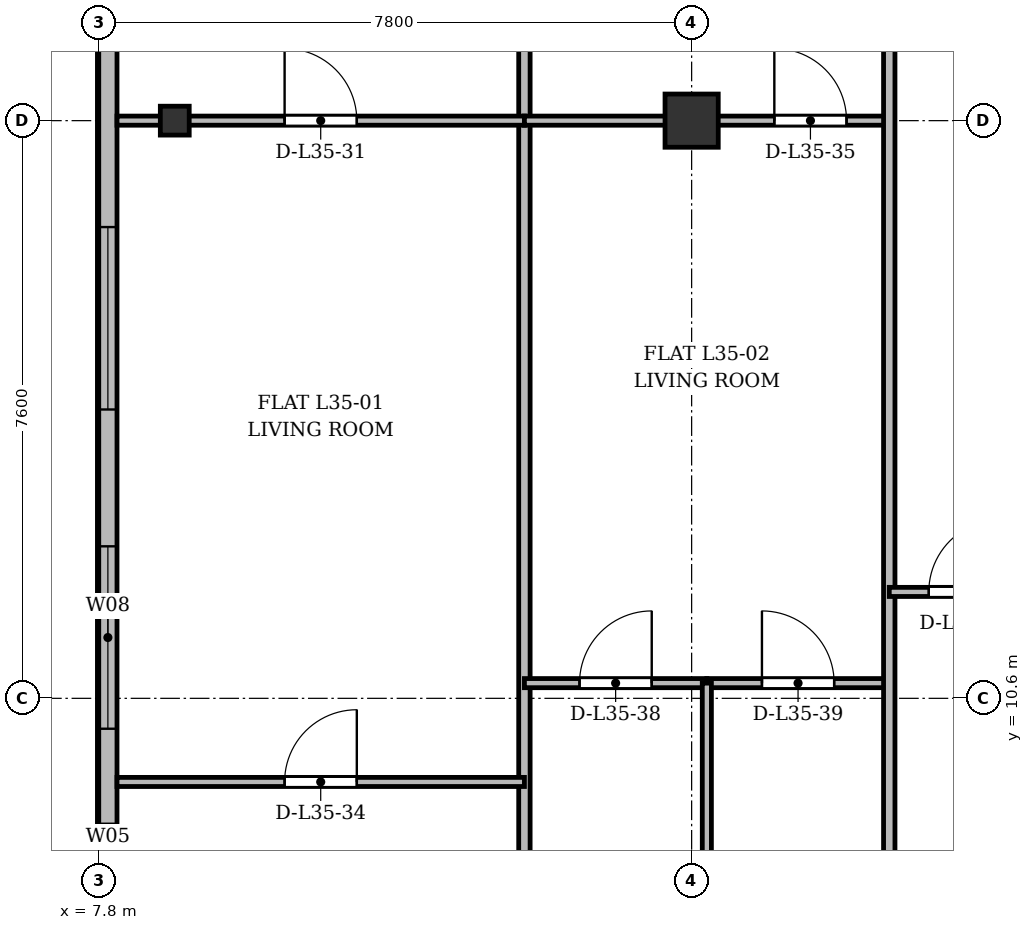
"""IFC4 building model, lengths in metres.
Left out: names, types, materials, properties, quantities, classifications, styles, units other than length and angle.
Written with IfcOpenShell. Run it as: python <this file> out.ifc"""

import sys

from ifc_helpers import new_model, si_unit, direction, frame, frame_2d, origin, origin_2d, place, context, subcontext, project, spatial, rectangle, i_section, extrude, source, transform, mapped, element, fill, save


model = new_model("IFC4")
c1 = context("Model", 3, precision=1e-05, world=origin(), true_north=direction((0.0, 1.0)))
c2 = subcontext(c1, "Body", "Model", "MODEL_VIEW")
j1 = project(units=[si_unit("LENGTHUNIT", "METRE"), si_unit("PLANEANGLEUNIT", "RADIAN")], contexts=[c1])
p1 = place(None, origin())
s1 = spatial("IfcSite", under=j1, at=p1, CompositionType="ELEMENT")
p2 = place(p1, origin())
s2 = spatial("IfcBuilding", under=s1, at=p2, CompositionType="ELEMENT")
p3 = place(p2, frame((0.0, 0.0, 135.7)))
s3 = spatial("IfcBuildingStorey", under=s2, at=p3, CompositionType="ELEMENT", Elevation=135.7)
m1 = source(origin(), c2, "Body", "SweptSolid", [
    extrude(i_section(OverallWidth=0.38, OverallDepth=0.38, WebThickness=0.02, FlangeThickness=0.03, at=origin_2d()), origin(), (0.0, 0.0, 1.0), 3.6),
])
p4 = place(p3, frame((8.8, 18.2, 0.0), z_axis=(0.0, 0.0, 1.0), x_axis=(1.0, 0.0, 0.0)))
e1 = element("IfcColumn", 1, at=p4, inside=s3, PredefinedType="COLUMN", context=c2, shape_type="MappedRepresentation", body=[
    mapped(m1, transform((0.0, 0.0, 0.0), x_axis=(1.0, 0.0, 0.0), y_axis=(0.0, 1.0, 0.0), z_axis=(0.0, 0.0, 1.0), scale=1.0)),
])
m2 = source(origin(), c2, "Body", "SweptSolid", [
    extrude(rectangle(XDim=0.7, YDim=0.7, at=origin_2d()), origin(), (0.0, 0.0, 1.0), 3.6),
])
p5 = place(p3, frame((15.6, 18.2, 0.0), z_axis=(0.0, 0.0, 1.0), x_axis=(1.0, 0.0, 0.0)))
e2 = element("IfcColumn", 2, at=p5, inside=s3, PredefinedType="COLUMN", context=c2, shape_type="MappedRepresentation", body=[
    mapped(m2, transform((0.0, 0.0, 0.0), x_axis=(1.0, 0.0, 0.0), y_axis=(0.0, 1.0, 0.0), z_axis=(0.0, 0.0, 1.0), scale=1.0)),
])
p6 = place(p3, frame((7.92, 6.3, 0.0), z_axis=(0.0, 0.0, 1.0), x_axis=(0.0, 1.0, 0.0)))
e3 = element("IfcWall", 3, at=p6, inside=s3, PredefinedType="SOLIDWALL", context=c2, shape_type="SweptSolid", body=[
    extrude(rectangle(XDim=39.2, YDim=0.24, at=frame_2d((19.6, 0.0))), origin(), (0.0, 0.0, 1.0), 3.35),
])
p7 = place(p6, frame((1.45, 0.0, 0.92)))
e4 = element("IfcOpeningElement", 4, at=p7, cuts=e3, PredefinedType="OPENING", context=c2, shape_type="SweptSolid", body=[
    extrude(rectangle(XDim=1.2, YDim=1.65, at=frame_2d((0.6, 0.825))), frame((0.0, 0.13, 0.0), z_axis=(0.0, -1.0, 0.0), x_axis=(1.0, 0.0, 0.0)), (0.0, 0.0, 1.0), 0.26),
])
p8 = place(p6, frame((3.9, 0.0, 0.92)))
e5 = element("IfcOpeningElement", 5, at=p8, cuts=e3, PredefinedType="OPENING", context=c2, shape_type="SweptSolid", body=[
    extrude(rectangle(XDim=2.4, YDim=2.1, at=frame_2d((1.2, 1.05))), frame((0.0, 0.13, 0.0), z_axis=(0.0, -1.0, 0.0), x_axis=(1.0, 0.0, 0.0)), (0.0, 0.0, 1.0), 0.26),
])
p9 = place(p6, frame((8.1, 0.0, 0.92)))
e6 = element("IfcOpeningElement", 6, at=p9, cuts=e3, PredefinedType="OPENING", context=c2, shape_type="SweptSolid", body=[
    extrude(rectangle(XDim=2.4, YDim=2.1, at=frame_2d((1.2, 1.05))), frame((0.0, 0.13, 0.0), z_axis=(0.0, -1.0, 0.0), x_axis=(1.0, 0.0, 0.0)), (0.0, 0.0, 1.0), 0.26),
])
p10 = place(p6, frame((15.3, 0.0, 0.92)))
e7 = element("IfcOpeningElement", 7, at=p10, cuts=e3, PredefinedType="OPENING", context=c2, shape_type="SweptSolid", body=[
    extrude(rectangle(XDim=2.4, YDim=2.1, at=frame_2d((1.2, 1.05))), frame((0.0, 0.13, 0.0), z_axis=(0.0, -1.0, 0.0), x_axis=(1.0, 0.0, 0.0)), (0.0, 0.0, 1.0), 0.26),
])
p11 = place(p6, frame((33.5, 0.0, 0.92)))
e8 = element("IfcOpeningElement", 8, at=p11, cuts=e3, PredefinedType="OPENING", context=c2, shape_type="SweptSolid", body=[
    extrude(rectangle(XDim=1.2, YDim=1.65, at=frame_2d((0.6, 0.825))), frame((0.0, 0.13, 0.0), z_axis=(0.0, -1.0, 0.0), x_axis=(1.0, 0.0, 0.0)), (0.0, 0.0, 1.0), 0.26),
])
p12 = place(p6, frame((36.85, 0.0, 0.92)))
e9 = element("IfcOpeningElement", 9, at=p12, cuts=e3, PredefinedType="OPENING", context=c2, shape_type="SweptSolid", body=[
    extrude(rectangle(XDim=1.2, YDim=1.65, at=frame_2d((0.6, 0.825))), frame((0.0, 0.13, 0.0), z_axis=(0.0, -1.0, 0.0), x_axis=(1.0, 0.0, 0.0)), (0.0, 0.0, 1.0), 0.26),
])
p13 = place(p3, frame((13.4, 3.525, 0.0), z_axis=(0.0, 0.0, 1.0), x_axis=(0.0, 1.0, 0.0)))
e10 = element("IfcWall", 10, at=p13, inside=s3, PredefinedType="PARTITIONING", context=c2, shape_type="SweptSolid", body=[
    extrude(rectangle(XDim=27.275, YDim=0.15, at=frame_2d((13.638, 0.0))), origin(), (0.0, 0.0, 1.0), 2.75),
])
p14 = place(p3, frame((8.04, 18.2, 0.0), z_axis=(0.0, 0.0, 1.0), x_axis=(1.0, 0.0, 0.0)))
e11 = element("IfcWall", 11, at=p14, inside=s3, PredefinedType="PARTITIONING", context=c2, shape_type="SweptSolid", body=[
    extrude(rectangle(XDim=5.36, YDim=0.12, at=frame_2d((2.68, 0.0))), origin(), (0.0, 0.0, 1.0), 2.75),
])
p15 = place(p14, frame((2.205, 0.0, 0.0)))
e12 = element("IfcOpeningElement", 12, at=p15, cuts=e11, PredefinedType="OPENING", context=c2, shape_type="SweptSolid", body=[
    extrude(rectangle(XDim=0.95, YDim=2.15, at=frame_2d((0.475, 1.075))), frame((0.0, 0.07, 0.0), z_axis=(0.0, -1.0, 0.0), x_axis=(1.0, 0.0, 0.0)), (0.0, 0.0, 1.0), 0.14),
])
p16 = place(p3, frame((8.04, 9.5, 0.0), z_axis=(0.0, 0.0, 1.0), x_axis=(1.0, 0.0, 0.0)))
e13 = element("IfcWall", 13, at=p16, inside=s3, PredefinedType="PARTITIONING", context=c2, shape_type="SweptSolid", body=[
    extrude(rectangle(XDim=5.36, YDim=0.12, at=frame_2d((2.68, 0.0))), origin(), (0.0, 0.0, 1.0), 2.85),
])
p17 = place(p16, frame((2.205, 0.0, 0.0)))
e14 = element("IfcOpeningElement", 14, at=p17, cuts=e13, PredefinedType="OPENING", context=c2, shape_type="SweptSolid", body=[
    extrude(rectangle(XDim=0.95, YDim=2.15, at=frame_2d((0.475, 1.075))), frame((0.0, 0.07, 0.0), z_axis=(0.0, -1.0, 0.0), x_axis=(1.0, 0.0, 0.0)), (0.0, 0.0, 1.0), 0.14),
])
p18 = place(p3, frame((13.4, 18.2, 0.0), z_axis=(0.0, 0.0, 1.0), x_axis=(1.0, 0.0, 0.0)))
e15 = element("IfcWall", 15, at=p18, inside=s3, PredefinedType="PARTITIONING", context=c2, shape_type="SweptSolid", body=[
    extrude(rectangle(XDim=4.8, YDim=0.12, at=frame_2d((2.4, 0.0))), origin(), (0.0, 0.0, 1.0), 2.75),
])
p19 = place(p18, frame((3.288, 0.0, 0.0)))
e16 = element("IfcOpeningElement", 16, at=p19, cuts=e15, PredefinedType="OPENING", context=c2, shape_type="SweptSolid", body=[
    extrude(rectangle(XDim=0.95, YDim=2.15, at=frame_2d((0.475, 1.075))), frame((0.0, 0.07, 0.0), z_axis=(0.0, -1.0, 0.0), x_axis=(1.0, 0.0, 0.0)), (0.0, 0.0, 1.0), 0.14),
])
p20 = place(p3, frame((13.4, 10.8, 0.0), z_axis=(0.0, 0.0, 1.0), x_axis=(1.0, 0.0, 0.0)))
e17 = element("IfcWall", 17, at=p20, inside=s3, PredefinedType="PARTITIONING", context=c2, shape_type="SweptSolid", body=[
    extrude(rectangle(XDim=2.4, YDim=0.12, at=frame_2d((1.2, 0.0))), origin(), (0.0, 0.0, 1.0), 2.85),
])
p21 = place(p20, frame((0.725, 0.0, 0.0)))
e18 = element("IfcOpeningElement", 18, at=p21, cuts=e17, PredefinedType="OPENING", context=c2, shape_type="SweptSolid", body=[
    extrude(rectangle(XDim=0.95, YDim=2.15, at=frame_2d((0.475, 1.075))), frame((0.0, 0.07, 0.0), z_axis=(0.0, -1.0, 0.0), x_axis=(1.0, 0.0, 0.0)), (0.0, 0.0, 1.0), 0.14),
])
p22 = place(p3, frame((15.8, 10.8, 0.0), z_axis=(0.0, 0.0, 1.0), x_axis=(1.0, 0.0, 0.0)))
e19 = element("IfcWall", 19, at=p22, inside=s3, PredefinedType="PARTITIONING", context=c2, shape_type="SweptSolid", body=[
    extrude(rectangle(XDim=2.4, YDim=0.12, at=frame_2d((1.2, 0.0))), origin(), (0.0, 0.0, 1.0), 3.0),
])
p23 = place(p22, frame((0.725, 0.0, 0.0)))
e20 = element("IfcOpeningElement", 20, at=p23, cuts=e19, PredefinedType="OPENING", context=c2, shape_type="SweptSolid", body=[
    extrude(rectangle(XDim=0.95, YDim=2.15, at=frame_2d((0.475, 1.075))), frame((0.0, 0.07, 0.0), z_axis=(0.0, -1.0, 0.0), x_axis=(1.0, 0.0, 0.0)), (0.0, 0.0, 1.0), 0.14),
])
p24 = place(p3, frame((15.8, 3.525, 0.0), z_axis=(0.0, 0.0, 1.0), x_axis=(0.0, 1.0, 0.0)))
e21 = element("IfcWall", 21, at=p24, inside=s3, PredefinedType="PARTITIONING", context=c2, shape_type="SweptSolid", body=[
    extrude(rectangle(XDim=7.275, YDim=0.12, at=frame_2d((3.638, 0.0))), origin(), (0.0, 0.0, 1.0), 2.75),
])
p25 = place(p3, frame((18.2, 3.525, 0.0), z_axis=(0.0, 0.0, 1.0), x_axis=(0.0, 1.0, 0.0)))
e22 = element("IfcWall", 22, at=p25, inside=s3, PredefinedType="PARTITIONING", context=c2, shape_type="SweptSolid", body=[
    extrude(rectangle(XDim=27.275, YDim=0.15, at=frame_2d((13.638, 0.0))), origin(), (0.0, 0.0, 1.0), 2.75),
])
p26 = place(p3, frame((18.2, 12.0, 0.0), z_axis=(0.0, 0.0, 1.0), x_axis=(1.0, 0.0, 0.0)))
e23 = element("IfcWall", 23, at=p26, inside=s3, PredefinedType="PARTITIONING", context=c2, shape_type="SweptSolid", body=[
    extrude(rectangle(XDim=2.0, YDim=0.12, at=frame_2d((1.0, 0.0))), origin(), (0.0, 0.0, 1.0), 3.35),
])
p27 = place(p26, frame((0.52, 0.0, 0.0)))
e24 = element("IfcOpeningElement", 24, at=p27, cuts=e23, PredefinedType="OPENING", context=c2, shape_type="SweptSolid", body=[
    extrude(rectangle(XDim=0.95, YDim=2.15, at=frame_2d((0.475, 1.075))), frame((0.0, 0.07, 0.0), z_axis=(0.0, -1.0, 0.0), x_axis=(1.0, 0.0, 0.0)), (0.0, 0.0, 1.0), 0.14),
])
m3 = source(origin(), c2, "Body", "SweptSolid", [
    extrude(rectangle(XDim=1.2, YDim=1.65, at=frame_2d((0.6, 0.825))), frame((0.0, 0.03, 0.0), z_axis=(0.0, -1.0, 0.0), x_axis=(1.0, 0.0, 0.0)), (0.0, 0.0, 1.0), 0.06),
])
p28 = place(p7, origin())
e25 = element("IfcWindow", 25, at=p28, inside=s3, PartitioningType="SINGLE_PANEL", PredefinedType="WINDOW", context=c2, shape_type="MappedRepresentation", body=[
    mapped(m3, transform((0.0, 0.0, 0.0), x_axis=(1.0, 0.0, 0.0), y_axis=(0.0, 1.0, 0.0), z_axis=(0.0, 0.0, 1.0), scale=1.0)),
])
fill(e4, e25)
m4 = source(origin(), c2, "Body", "SweptSolid", [
    extrude(rectangle(XDim=2.4, YDim=2.1, at=frame_2d((1.2, 1.05))), frame((0.0, 0.03, 0.0), z_axis=(0.0, -1.0, 0.0), x_axis=(1.0, 0.0, 0.0)), (0.0, 0.0, 1.0), 0.06),
])
p29 = place(p8, origin())
e26 = element("IfcWindow", 26, at=p29, inside=s3, PartitioningType="SINGLE_PANEL", PredefinedType="WINDOW", context=c2, shape_type="MappedRepresentation", body=[
    mapped(m4, transform((0.0, 0.0, 0.0), x_axis=(1.0, 0.0, 0.0), y_axis=(0.0, 1.0, 0.0), z_axis=(0.0, 0.0, 1.0), scale=1.0)),
])
fill(e5, e26)
p30 = place(p9, origin())
e27 = element("IfcWindow", 27, at=p30, inside=s3, PartitioningType="SINGLE_PANEL", PredefinedType="WINDOW", context=c2, shape_type="MappedRepresentation", body=[
    mapped(m4, transform((0.0, 0.0, 0.0), x_axis=(1.0, 0.0, 0.0), y_axis=(0.0, 1.0, 0.0), z_axis=(0.0, 0.0, 1.0), scale=1.0)),
])
fill(e6, e27)
m5 = source(origin(), c2, "Body", "SweptSolid", [
    extrude(rectangle(XDim=0.95, YDim=2.15, at=frame_2d((0.475, 1.075))), frame((0.0, 0.025, 0.0), z_axis=(0.0, -1.0, 0.0), x_axis=(1.0, 0.0, 0.0)), (0.0, 0.0, 1.0), 0.05),
])
p31 = place(p15, origin())
e28 = element("IfcDoor", 28, at=p31, inside=s3, OperationType="SINGLE_SWING_LEFT", PredefinedType="DOOR", context=c2, shape_type="MappedRepresentation", body=[
    mapped(m5, transform((0.0, 0.0, 0.0), x_axis=(1.0, 0.0, 0.0), y_axis=(0.0, 1.0, 0.0), z_axis=(0.0, 0.0, 1.0), scale=1.0)),
])
fill(e12, e28)
p32 = place(p17, origin())
e29 = element("IfcDoor", 29, at=p32, inside=s3, OperationType="SINGLE_SWING_RIGHT", PredefinedType="DOOR", context=c2, shape_type="MappedRepresentation", body=[
    mapped(m5, transform((0.0, 0.0, 0.0), x_axis=(1.0, 0.0, 0.0), y_axis=(0.0, 1.0, 0.0), z_axis=(0.0, 0.0, 1.0), scale=1.0)),
])
fill(e14, e29)
p33 = place(p19, origin())
e30 = element("IfcDoor", 30, at=p33, inside=s3, OperationType="SINGLE_SWING_LEFT", PredefinedType="DOOR", context=c2, shape_type="MappedRepresentation", body=[
    mapped(m5, transform((0.0, 0.0, 0.0), x_axis=(1.0, 0.0, 0.0), y_axis=(0.0, 1.0, 0.0), z_axis=(0.0, 0.0, 1.0), scale=1.0)),
])
fill(e16, e30)
p34 = place(p21, origin())
e31 = element("IfcDoor", 31, at=p34, inside=s3, OperationType="SINGLE_SWING_RIGHT", PredefinedType="DOOR", context=c2, shape_type="MappedRepresentation", body=[
    mapped(m5, transform((0.0, 0.0, 0.0), x_axis=(1.0, 0.0, 0.0), y_axis=(0.0, 1.0, 0.0), z_axis=(0.0, 0.0, 1.0), scale=1.0)),
])
fill(e18, e31)
p35 = place(p23, origin())
e32 = element("IfcDoor", 32, at=p35, inside=s3, OperationType="SINGLE_SWING_LEFT", PredefinedType="DOOR", context=c2, shape_type="MappedRepresentation", body=[
    mapped(m5, transform((0.0, 0.0, 0.0), x_axis=(1.0, 0.0, 0.0), y_axis=(0.0, 1.0, 0.0), z_axis=(0.0, 0.0, 1.0), scale=1.0)),
])
fill(e20, e32)
p36 = place(p27, origin())
e33 = element("IfcDoor", 33, at=p36, inside=s3, OperationType="SINGLE_SWING_RIGHT", PredefinedType="DOOR", context=c2, shape_type="MappedRepresentation", body=[
    mapped(m5, transform((0.0, 0.0, 0.0), x_axis=(1.0, 0.0, 0.0), y_axis=(0.0, 1.0, 0.0), z_axis=(0.0, 0.0, 1.0), scale=1.0)),
])
fill(e24, e33)
save(model, sys.argv[1])
